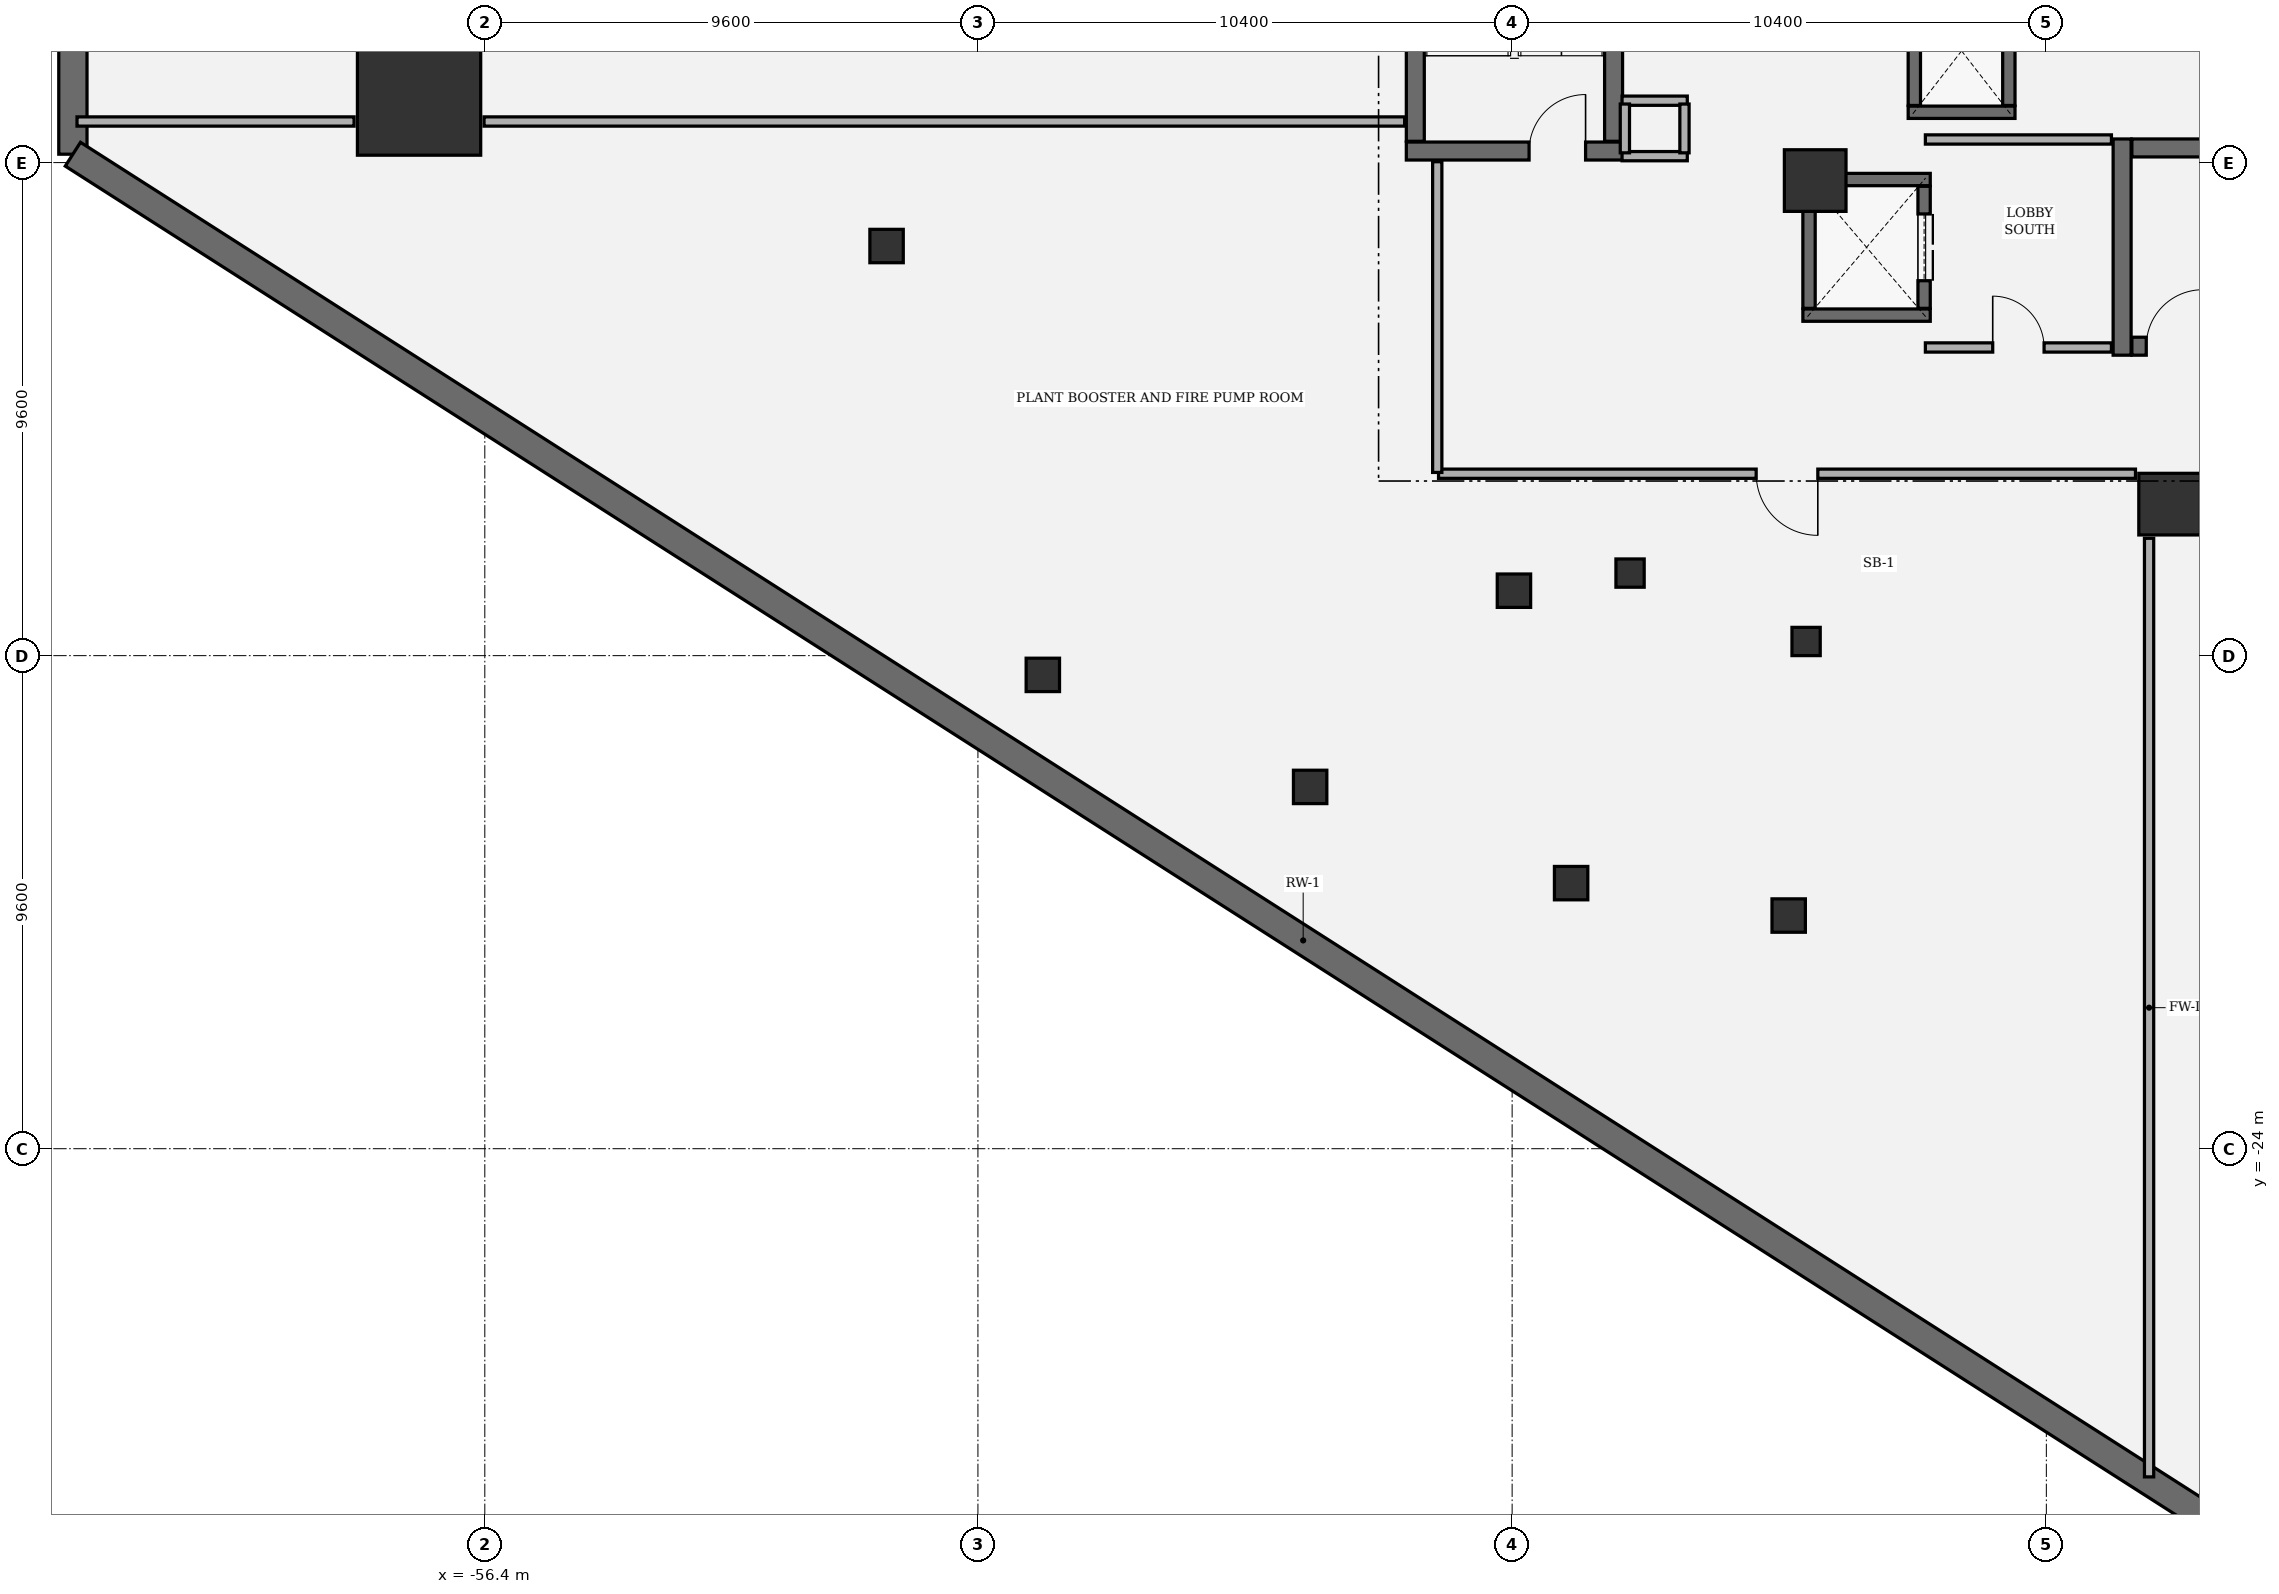
"""IFC4 building model, lengths in metres.
Left out: names, types, materials, properties, quantities, classifications, styles, units other than length and angle.
Written with IfcOpenShell. Run it as: python <this file> out.ifc"""

import sys

from ifc_helpers import new_model, si_unit, direction, frame, frame_2d, origin, origin_2d, place, context, subcontext, project, spatial, rectangle, extrude, element, fill, save


model = new_model("IFC4")
c1 = context("Model", 3, precision=1e-05, world=origin(), true_north=direction((0.0, 1.0)))
c2 = subcontext(c1, "Body", "Model", "MODEL_VIEW")
j1 = project(units=[si_unit("LENGTHUNIT", "METRE"), si_unit("PLANEANGLEUNIT", "RADIAN")], contexts=[c1])
p1 = place(None, origin())
s1 = spatial("IfcSite", under=j1, at=p1, CompositionType="ELEMENT")
p2 = place(p1, origin())
s2 = spatial("IfcBuilding", under=s1, at=p2, CompositionType="ELEMENT")
p3 = place(p2, frame((0.0, 0.0, -5.4)))
s3 = spatial("IfcBuildingStorey", under=s2, at=p3, CompositionType="ELEMENT", Elevation=-5.4)
p4 = place(p3, frame((-64.419, 4.637, 0.0), z_axis=(0.0, 0.0, 1.0), x_axis=(0.0, -1.0, 0.0)))
e1 = element("IfcWall", 1, at=p4, inside=s3, PredefinedType="USERDEFINED", context=c2, shape_type="SweptSolid", body=[
    extrude(rectangle(XDim=9.273, YDim=0.55, at=frame_2d((4.637, 0.0))), origin(), (0.0, 0.0, 1.0), 4.3),
])
p5 = place(p3, frame((-64.419, -4.637, 0.0), z_axis=(0.0, 0.0, 1.0), x_axis=(0.842602364841, -0.538536214905, 0.0)))
e2 = element("IfcWall", 2, at=p5, inside=s3, PredefinedType="USERDEFINED", context=c2, shape_type="SweptSolid", body=[
    extrude(rectangle(XDim=60.27, YDim=0.55, at=frame_2d((30.135, 0.0))), origin(), (0.0, 0.0, 1.0), 4.3),
])
p6 = place(p3, frame((-57.68, -3.456, 0.0), z_axis=(0.0, 0.0, 1.0), x_axis=(1.0, 0.0, 0.0)))
e3 = element("IfcColumn", 3, at=p6, inside=s3, PredefinedType="COLUMN", context=c2, shape_type="SweptSolid", body=[
    extrude(rectangle(XDim=2.4, YDim=2.4, at=origin_2d()), origin(), (0.0, 0.0, 1.0), 5.4),
])
for number, where, z_axis, x_axis in (
    (4, (-23.6, -11.45, 0.0), (0.0, 0.0, 1.0), (1.0, 0.0, 0.0)),
    (5, (-30.5, -5.15, 0.0), (0.0, 0.0, 1.0), (1.0, 0.0, 0.0)),
):
    element("IfcColumn", number, at=place(p3, frame(where, z_axis=z_axis, x_axis=x_axis)), inside=s3, PredefinedType="COLUMN", context=c2, shape_type="SweptSolid", body=[
        extrude(rectangle(XDim=1.2, YDim=1.2, at=origin_2d()), origin(), (0.0, 0.0, 1.0), 5.4),
    ])
for number, where, z_axis, x_axis in (
    (6, (-45.536, -14.775, 0.0), (0.0, 0.0, 1.0), (1.0, 0.0, 0.0)),
    (7, (-40.333, -16.956, 0.0), (0.0, 0.0, 1.0), (1.0, 0.0, 0.0)),
    (8, (-35.252, -18.829, 0.0), (0.0, 0.0, 1.0), (1.0, 0.0, 0.0)),
    (9, (-31.016, -19.46, 0.0), (0.0, 0.0, 1.0), (1.0, 0.0, 0.0)),
    (10, (-48.578, -6.425, 0.0), (0.0, 0.0, 1.0), (1.0, 0.0, 0.0)),
    (11, (-36.365, -13.135, 0.0), (0.0, 0.0, 1.0), (1.0, 0.0, 0.0)),
):
    element("IfcColumn", number, at=place(p3, frame(where, z_axis=z_axis, x_axis=x_axis)), inside=s3, PredefinedType="COLUMN", context=c2, shape_type="SweptSolid", body=[
        extrude(rectangle(XDim=0.65, YDim=0.65, at=origin_2d()), origin(), (0.0, 0.0, 1.0), 5.4),
    ])
for number, where, z_axis, x_axis in (
    (12, (-34.104, -12.792, 0.0), (0.0, 0.0, 1.0), (1.0, 0.0, 0.0)),
    (13, (-30.677, -14.124, 0.0), (0.0, 0.0, 1.0), (1.0, 0.0, 0.0)),
):
    element("IfcColumn", number, at=place(p3, frame(where, z_axis=z_axis, x_axis=x_axis)), inside=s3, PredefinedType="COLUMN", context=c2, shape_type="SweptSolid", body=[
        extrude(rectangle(XDim=0.55, YDim=0.55, at=origin_2d()), origin(), (0.0, 0.0, 1.0), 5.4),
    ])
p7 = place(p3, frame((-24.525, -4.34, 0.0), z_axis=(0.0, 0.0, 1.0), x_axis=(0.0, -1.0, 0.0)))
e14 = element("IfcWall", 14, at=p7, inside=s3, PredefinedType="SHEAR", context=c2, shape_type="SweptSolid", body=[
    extrude(rectangle(XDim=4.21, YDim=0.35, at=frame_2d((2.105, 0.0))), origin(), (0.0, 0.0, 1.0), 5.1),
])
p8 = place(p3, frame((-24.335, -8.375, 0.0), z_axis=(0.0, 0.0, 1.0), x_axis=(1.0, 0.0, 0.0)))
e15 = element("IfcWall", 15, at=p8, inside=s3, PredefinedType="SHEAR", context=c2, shape_type="SweptSolid", body=[
    extrude(rectangle(XDim=8.12, YDim=0.35, at=frame_2d((4.06, 0.0))), origin(), (0.0, 0.0, 1.0), 5.1),
])
p9 = place(p8, frame((0.28, 0.0, 0.0)))
e16 = element("IfcOpeningElement", 16, at=p9, cuts=e15, PredefinedType="OPENING", context=c2, shape_type="SweptSolid", body=[
    extrude(rectangle(XDim=1.1, YDim=2.2, at=frame_2d((0.55, 1.1))), frame((0.0, 0.185, 0.0), z_axis=(0.0, -1.0, 0.0), x_axis=(1.0, 0.0, 0.0)), (0.0, 0.0, 1.0), 0.37),
])
p10 = place(p3, frame((-16.215, -4.515, 0.0), z_axis=(0.0, 0.0, 1.0), x_axis=(-1.0, 0.0, 0.0)))
e17 = element("IfcWall", 17, at=p10, inside=s3, PredefinedType="SHEAR", context=c2, shape_type="SweptSolid", body=[
    extrude(rectangle(XDim=8.12, YDim=0.35, at=frame_2d((4.06, 0.0))), origin(), (0.0, 0.0, 1.0), 5.1),
])
p11 = place(p3, frame((-38.46, -4.575, 0.0), z_axis=(0.0, 0.0, 1.0), x_axis=(1.0, 0.0, 0.0)))
e18 = element("IfcWall", 18, at=p11, inside=s3, PredefinedType="SHEAR", context=c2, shape_type="SweptSolid", body=[
    extrude(rectangle(XDim=4.21, YDim=0.35, at=frame_2d((2.105, 0.0))), origin(), (0.0, 0.0, 1.0), 5.1),
])
p12 = place(p11, frame((2.39, 0.0, 0.0)))
e19 = element("IfcOpeningElement", 19, at=p12, cuts=e18, PredefinedType="OPENING", context=c2, shape_type="SweptSolid", body=[
    extrude(rectangle(XDim=1.1, YDim=2.2, at=frame_2d((0.55, 1.1))), frame((0.0, 0.185, 0.0), z_axis=(0.0, -1.0, 0.0), x_axis=(1.0, 0.0, 0.0)), (0.0, 0.0, 1.0), 0.37),
])
for number, where, z_axis, x_axis in (
    (20, (-34.425, -4.385, 0.0), (0.0, 0.0, 1.0), (0.0, 1.0, 0.0)),
    (21, (-38.285, 4.385, 0.0), (0.0, 0.0, 1.0), (0.0, -1.0, 0.0)),
):
    element("IfcWall", number, at=place(p3, frame(where, z_axis=z_axis, x_axis=x_axis)), inside=s3, PredefinedType="SHEAR", context=c2, shape_type="SweptSolid", body=[
        extrude(rectangle(XDim=8.77, YDim=0.35, at=frame_2d((4.385, 0.0))), origin(), (0.0, 0.0, 1.0), 5.1),
    ])
for number, where, z_axis, x_axis in (
    (22, (-28.26, -7.77, 0.0), (0.0, 0.0, 1.0), (-1.0, 0.0, 0.0)),
    (23, (-30.74, -5.13, 0.0), (0.0, 0.0, 1.0), (1.0, 0.0, 0.0)),
):
    element("IfcWall", number, at=place(p3, frame(where, z_axis=z_axis, x_axis=x_axis)), inside=s3, PredefinedType="SHEAR", context=c2, shape_type="SweptSolid", body=[
        extrude(rectangle(XDim=2.48, YDim=0.24, at=frame_2d((1.24, 0.0))), origin(), (0.0, 0.0, 1.0), 5.1),
    ])
p13 = place(p3, frame((-30.62, -7.638, 0.0), z_axis=(0.0, 0.0, 1.0), x_axis=(0.0, 1.0, 0.0)))
e24 = element("IfcWall", 24, at=p13, inside=s3, PredefinedType="SHEAR", context=c2, shape_type="SweptSolid", body=[
    extrude(rectangle(XDim=2.376, YDim=0.24, at=frame_2d((1.188, 0.0))), origin(), (0.0, 0.0, 1.0), 5.1),
])
p14 = place(p3, frame((-28.38, -5.262, 0.0), z_axis=(0.0, 0.0, 1.0), x_axis=(0.0, -1.0, 0.0)))
e25 = element("IfcWall", 25, at=p14, inside=s3, PredefinedType="SHEAR", context=c2, shape_type="SweptSolid", body=[
    extrude(rectangle(XDim=2.376, YDim=0.24, at=frame_2d((1.188, 0.0))), origin(), (0.0, 0.0, 1.0), 5.1),
])
p15 = place(p14, frame((0.538, 0.0, 0.0)))
e26 = element("IfcOpeningElement", 26, at=p15, cuts=e25, PredefinedType="OPENING", context=c2, shape_type="SweptSolid", body=[
    extrude(rectangle(XDim=1.3, YDim=2.3, at=frame_2d((0.65, 1.15))), frame((0.0, 0.13, 0.0), z_axis=(0.0, -1.0, 0.0), x_axis=(1.0, 0.0, 0.0)), (0.0, 0.0, 1.0), 0.26),
])
p16 = place(p3, frame((-26.61, -3.82, 0.0), z_axis=(0.0, 0.0, 1.0), x_axis=(-1.0, 0.0, 0.0)))
e27 = element("IfcWall", 27, at=p16, inside=s3, PredefinedType="SHEAR", context=c2, shape_type="SweptSolid", body=[
    extrude(rectangle(XDim=2.08, YDim=0.24, at=frame_2d((1.04, 0.0))), origin(), (0.0, 0.0, 1.0), 5.1),
])
for number, where, z_axis, x_axis in (
    (28, (-28.57, -3.688, 0.0), (0.0, 0.0, 1.0), (0.0, 1.0, 0.0)),
    (29, (-26.73, -1.562, 0.0), (0.0, 0.0, 1.0), (0.0, -1.0, 0.0)),
):
    element("IfcWall", number, at=place(p3, frame(where, z_axis=z_axis, x_axis=x_axis)), inside=s3, PredefinedType="SHEAR", context=c2, shape_type="SweptSolid", body=[
        extrude(rectangle(XDim=2.126, YDim=0.24, at=frame_2d((1.063, 0.0))), origin(), (0.0, 0.0, 1.0), 5.1),
    ])
for number, where, z_axis, x_axis in (
    (30, (-32.99, -4.675, 0.0), (0.0, 0.0, 1.0), (-1.0, 0.0, 0.0)),
    (31, (-34.26, -3.595, 0.0), (0.0, 0.0, 1.0), (1.0, 0.0, 0.0)),
):
    element("IfcWall", number, at=place(p3, frame(where, z_axis=z_axis, x_axis=x_axis)), inside=s3, PredefinedType="PARTITIONING", context=c2, shape_type="SweptSolid", body=[
        extrude(rectangle(XDim=1.27, YDim=0.18, at=frame_2d((0.635, 0.0))), origin(), (0.0, 0.0, 1.0), 5.1),
    ])
for number, where, z_axis, x_axis in (
    (32, (-34.205, -4.61, 0.0), (0.0, 0.0, 1.0), (0.0, 1.0, 0.0)),
    (33, (-33.045, -3.66, 0.0), (0.0, 0.0, 1.0), (0.0, -1.0, 0.0)),
):
    element("IfcWall", number, at=place(p3, frame(where, z_axis=z_axis, x_axis=x_axis)), inside=s3, PredefinedType="PARTITIONING", context=c2, shape_type="SweptSolid", body=[
        extrude(rectangle(XDim=0.95, YDim=0.18, at=frame_2d((0.475, 0.0))), origin(), (0.0, 0.0, 1.0), 5.1),
    ])
p17 = place(p3, frame((-28.355, -8.4, 0.0), z_axis=(0.0, 0.0, 1.0), x_axis=(1.0, 0.0, 0.0)))
e34 = element("IfcWall", 34, at=p17, inside=s3, PredefinedType="PARTITIONING", context=c2, shape_type="SweptSolid", body=[
    extrude(rectangle(XDim=3.622, YDim=0.18, at=frame_2d((1.811, 0.0))), origin(), (0.0, 0.0, 1.0), 5.1),
])
p18 = place(p17, frame((1.311, 0.0, 0.0)))
e35 = element("IfcOpeningElement", 35, at=p18, cuts=e34, PredefinedType="OPENING", context=c2, shape_type="SweptSolid", body=[
    extrude(rectangle(XDim=1.0, YDim=2.15, at=frame_2d((0.5, 1.075))), frame((0.0, 0.1, 0.0), z_axis=(0.0, -1.0, 0.0), x_axis=(1.0, 0.0, 0.0)), (0.0, 0.0, 1.0), 0.2),
])
p19 = place(p3, frame((-24.733, -4.35, 0.0), z_axis=(0.0, 0.0, 1.0), x_axis=(-1.0, 0.0, 0.0)))
e36 = element("IfcWall", 36, at=p19, inside=s3, PredefinedType="PARTITIONING", context=c2, shape_type="SweptSolid", body=[
    extrude(rectangle(XDim=3.622, YDim=0.18, at=frame_2d((1.811, 0.0))), origin(), (0.0, 0.0, 1.0), 5.1),
])
p20 = place(p3, frame((-24.0, -30.39, 0.0), z_axis=(0.0, 0.0, 1.0), x_axis=(0.0, 1.0, 0.0)))
e37 = element("IfcWall", 37, at=p20, inside=s3, PredefinedType="PARTITIONING", context=c2, shape_type="SweptSolid", body=[
    extrude(rectangle(XDim=18.275, YDim=0.18, at=frame_2d((9.137, 0.0))), origin(), (0.0, 0.0, 1.0), 4.613),
])
p21 = place(p3, frame((-24.265, -10.858, 0.0), z_axis=(0.0, 0.0, 1.0), x_axis=(-1.0, 0.0, 0.0)))
e38 = element("IfcWall", 38, at=p21, inside=s3, PredefinedType="PARTITIONING", context=c2, shape_type="SweptSolid", body=[
    extrude(rectangle(XDim=13.568, YDim=0.18, at=frame_2d((6.784, 0.0))), origin(), (0.0, 0.0, 1.0), 4.613),
])
p22 = place(p21, frame((6.184, 0.0, 0.0)))
e39 = element("IfcOpeningElement", 39, at=p22, cuts=e38, PredefinedType="OPENING", context=c2, shape_type="SweptSolid", body=[
    extrude(rectangle(XDim=1.2, YDim=2.15, at=frame_2d((0.6, 1.075))), frame((0.0, 0.1, 0.0), z_axis=(0.0, -1.0, 0.0), x_axis=(1.0, 0.0, 0.0)), (0.0, 0.0, 1.0), 0.2),
])
p23 = place(p3, frame((-37.858, -10.833, 0.0), z_axis=(0.0, 0.0, 1.0), x_axis=(0.0, 1.0, 0.0)))
e40 = element("IfcWall", 40, at=p23, inside=s3, PredefinedType="PARTITIONING", context=c2, shape_type="SweptSolid", body=[
    extrude(rectangle(XDim=6.05, YDim=0.18, at=frame_2d((3.025, 0.0))), origin(), (0.0, 0.0, 1.0), 5.1),
])
p24 = place(p3, frame((-38.493, -4.0, 0.0), z_axis=(0.0, 0.0, 1.0), x_axis=(-1.0, 0.0, 0.0)))
e41 = element("IfcWall", 41, at=p24, inside=s3, PredefinedType="PARTITIONING", context=c2, shape_type="SweptSolid", body=[
    extrude(rectangle(XDim=17.922, YDim=0.18, at=frame_2d((8.961, 0.0))), origin(), (0.0, 0.0, 1.0), 4.07),
])
p25 = place(p3, frame((-58.945, -4.0, 0.0), z_axis=(0.0, 0.0, 1.0), x_axis=(-1.0, 0.0, 0.0)))
e42 = element("IfcWall", 42, at=p25, inside=s3, PredefinedType="PARTITIONING", context=c2, shape_type="SweptSolid", body=[
    extrude(rectangle(XDim=5.394, YDim=0.18, at=frame_2d((2.697, 0.0))), origin(), (0.0, 0.0, 1.0), 5.1),
])
p26 = place(p9, origin())
e43 = element("IfcDoor", 43, at=p26, inside=s3, OperationType="SINGLE_SWING_RIGHT", PredefinedType="DOOR", context=c2, shape_type="SweptSolid", body=[
    extrude(rectangle(XDim=1.1, YDim=2.2, at=frame_2d((0.55, 1.1))), frame((0.0, 0.025, 0.0), z_axis=(0.0, -1.0, 0.0), x_axis=(1.0, 0.0, 0.0)), (0.0, 0.0, 1.0), 0.05),
])
fill(e16, e43)
p27 = place(p12, origin())
e44 = element("IfcDoor", 44, at=p27, inside=s3, OperationType="SINGLE_SWING_RIGHT", PredefinedType="DOOR", context=c2, shape_type="SweptSolid", body=[
    extrude(rectangle(XDim=1.1, YDim=2.2, at=frame_2d((0.55, 1.1))), frame((0.0, 0.025, 0.0), z_axis=(0.0, -1.0, 0.0), x_axis=(1.0, 0.0, 0.0)), (0.0, 0.0, 1.0), 0.05),
])
fill(e19, e44)
p28 = place(p15, origin())
e45 = element("IfcDoor", 45, at=p28, inside=s3, OperationType="DOUBLE_DOOR_SLIDING", PredefinedType="DOOR", context=c2, shape_type="SweptSolid", body=[
    extrude(rectangle(XDim=1.3, YDim=2.3, at=frame_2d((0.65, 1.15))), frame((0.0, 0.025, 0.0), z_axis=(0.0, -1.0, 0.0), x_axis=(1.0, 0.0, 0.0)), (0.0, 0.0, 1.0), 0.05),
])
fill(e26, e45)
p29 = place(p22, origin())
e46 = element("IfcDoor", 46, at=p29, inside=s3, OperationType="SINGLE_SWING_LEFT", PredefinedType="DOOR", context=c2, shape_type="SweptSolid", body=[
    extrude(rectangle(XDim=1.2, YDim=2.15, at=frame_2d((0.6, 1.075))), frame((0.0, 0.025, 0.0), z_axis=(0.0, -1.0, 0.0), x_axis=(1.0, 0.0, 0.0)), (0.0, 0.0, 1.0), 0.05),
])
fill(e39, e46)
p30 = place(p18, origin())
e47 = element("IfcDoor", 47, at=p30, inside=s3, OperationType="SINGLE_SWING_LEFT", PredefinedType="DOOR", context=c2, shape_type="SweptSolid", body=[
    extrude(rectangle(XDim=1.0, YDim=2.15, at=frame_2d((0.5, 1.075))), frame((0.0, 0.025, 0.0), z_axis=(0.0, -1.0, 0.0), x_axis=(1.0, 0.0, 0.0)), (0.0, 0.0, 1.0), 0.05),
])
fill(e35, e47)
save(model, sys.argv[1])
